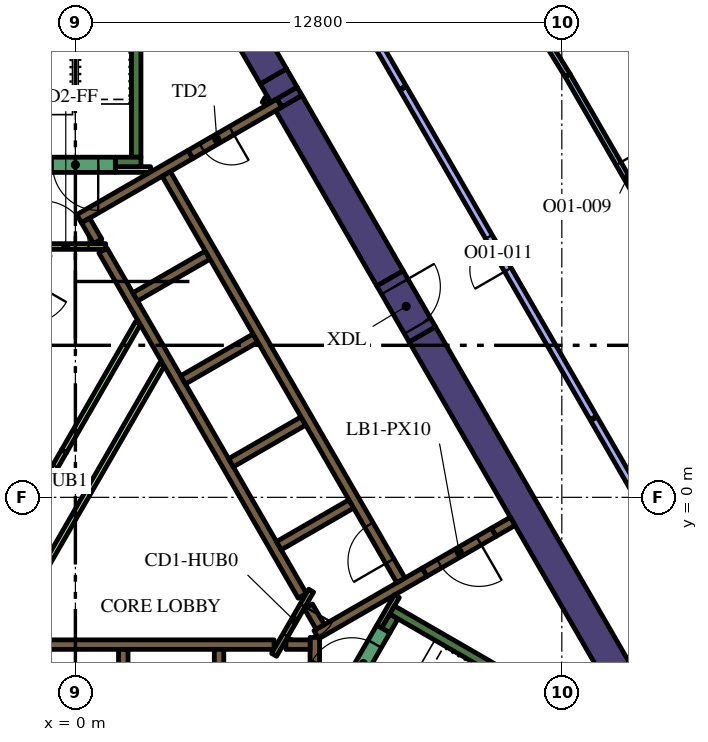
"""IFC4 building model, lengths in metres.
Left out: names, types, materials, properties, quantities, classifications, styles, units other than length and angle.
Written with IfcOpenShell. Run it as: python <this file> out.ifc"""

import sys

from ifc_helpers import new_model, si_unit, direction, frame, frame_2d, origin, place, context, subcontext, project, spatial, polyline, rectangle, outline, extrude, element, fill, save


model = new_model("IFC4")
c1 = context("Model", 3, precision=1e-05, world=origin(), true_north=direction((0.0, 1.0)))
c2 = subcontext(c1, "Body", "Model", "MODEL_VIEW")
j1 = project(units=[si_unit("LENGTHUNIT", "METRE"), si_unit("PLANEANGLEUNIT", "RADIAN")], contexts=[c1])
p1 = place(None, origin())
s1 = spatial("IfcSite", under=j1, at=p1, CompositionType="ELEMENT")
p2 = place(p1, origin())
s2 = spatial("IfcBuilding", under=s1, at=p2, CompositionType="ELEMENT")
p3 = place(p2, frame((0.0, 0.0, 145.8)))
s3 = spatial("IfcBuildingStorey", under=s2, at=p3, CompositionType="ELEMENT", Elevation=145.8)
p4 = place(p3, frame((9.129, 4.289, 0.0), z_axis=(0.0, 0.0, 1.0), x_axis=(0.499995742806, -0.866027861663, 0.0)))
e1 = element("IfcWall", 1, at=p4, inside=s3, PredefinedType="SOLIDWALL", context=c2, shape_type="SweptSolid", body=[
    extrude(rectangle(XDim=12.527, YDim=0.8, at=frame_2d((6.264, 0.0))), origin(), (0.0, 0.0, 1.0), 4.2),
])
p5 = place(p3, frame((5.489, 10.594, 0.0), z_axis=(0.0, 0.0, 1.0), x_axis=(-0.500000383388, 0.866025182435, 0.0)))
e2 = element("IfcWall", 2, at=p5, inside=s3, PredefinedType="SOLIDWALL", context=c2, shape_type="SweptSolid", body=[
    extrude(rectangle(XDim=0.558, YDim=0.8, at=frame_2d((0.279, 0.0))), origin(), (0.0, 0.0, 1.0), 4.2),
])
p6 = place(p3, frame((5.615, 10.375, 0.0), z_axis=(0.0, 0.0, 1.0), x_axis=(0.500002746266, -0.866023818221, 0.0)))
e3 = element("IfcWall", 3, at=p6, inside=s3, PredefinedType="SOLIDWALL", context=c2, shape_type="SweptSolid", body=[
    extrude(rectangle(XDim=5.328, YDim=0.8, at=frame_2d((2.664, 0.0))), origin(), (0.0, 0.0, 1.0), 4.2),
])
p7 = place(p3, origin())
e4 = element("IfcWall", 4, at=p7, inside=s3, PredefinedType="SOLIDWALL", context=c2, shape_type="SweptSolid", body=[
    extrude(outline(polyline([(5.432, 10.272), (5.308, 10.487), (5.836, 10.792), (5.96, 10.577), (5.432, 10.272)])), origin(), (0.0, 0.0, 1.0), 4.2),
])
p8 = place(p3, frame((5.209, 11.078, 0.0), z_axis=(0.0, 0.0, 1.0), x_axis=(-0.500035624827, 0.866004834804, 0.0)))
e5 = element("IfcWall", 5, at=p8, inside=s3, PredefinedType="SOLIDWALL", context=c2, shape_type="SweptSolid", body=[
    extrude(rectangle(XDim=6.388, YDim=0.8, at=frame_2d((3.194, 0.0))), origin(), (0.0, 0.0, 1.0), 4.2),
])
p9 = place(p3, frame((8.334, -2.964, 0.0), z_axis=(0.0, 0.0, 1.0), x_axis=(0.866016039709, -0.500016218704, 0.0)))
e6 = element("IfcWall", 6, at=p9, inside=s3, PredefinedType="SOLIDWALL", context=c2, shape_type="SweptSolid", body=[
    extrude(rectangle(XDim=7.05, YDim=0.25, at=frame_2d((3.525, 0.0))), origin(), (0.0, 0.0, 1.0), 4.2),
])
p10 = place(p3, frame((8.168, -3.503, 0.0), z_axis=(0.0, 0.0, 1.0), x_axis=(0.49972245349, 0.866185586049, 0.0)))
e7 = element("IfcWall", 7, at=p10, inside=s3, PredefinedType="SOLIDWALL", context=c2, shape_type="SweptSolid", body=[
    extrude(rectangle(XDim=0.425, YDim=0.25, at=frame_2d((0.212, 0.0))), origin(), (0.0, 0.0, 1.0), 4.2),
])
p11 = place(p3, frame((1.6, 8.95, 0.0), z_axis=(0.0, 0.0, 1.0), x_axis=(0.0, 1.0, 0.0)))
e8 = element("IfcWall", 8, at=p11, inside=s3, PredefinedType="SOLIDWALL", context=c2, shape_type="SweptSolid", body=[
    extrude(rectangle(XDim=6.8, YDim=0.25, at=frame_2d((3.4, 0.0))), origin(), (0.0, 0.0, 1.0), 4.2),
])
p12 = place(p3, frame((1.05, 8.825, 0.0), z_axis=(0.0, 0.0, 1.0), x_axis=(1.0, 0.0, 0.0)))
e9 = element("IfcWall", 9, at=p12, inside=s3, PredefinedType="SOLIDWALL", context=c2, shape_type="SweptSolid", body=[
    extrude(rectangle(XDim=0.675, YDim=0.25, at=frame_2d((0.337, 0.0))), origin(), (0.0, 0.0, 1.0), 4.2),
])
p13 = place(p3, frame((-5.259, -3.875, 0.0), z_axis=(0.0, 0.0, 1.0), x_axis=(1.0, 0.0, 0.0)))
e10 = element("IfcWall", 10, at=p13, inside=s3, PredefinedType="SOLIDWALL", context=c2, shape_type="SweptSolid", body=[
    extrude(rectangle(XDim=10.489, YDim=0.25, at=frame_2d((5.244, 0.0))), origin(), (0.0, 0.0, 1.0), 4.2),
])
for number, where, z_axis, x_axis in (
    (11, (3.78, -4.0, 0.0), (0.0, 0.0, 1.0), (0.0, -1.0, 0.0)),
    (12, (1.26, -4.0, 0.0), (0.0, 0.0, 1.0), (0.0, -1.0, 0.0)),
):
    element("IfcWall", number, at=place(p3, frame(where, z_axis=z_axis, x_axis=x_axis)), inside=s3, PredefinedType="SOLIDWALL", context=c2, shape_type="SweptSolid", body=[
        extrude(rectangle(XDim=2.2, YDim=0.25, at=frame_2d((1.1, 0.0))), origin(), (0.0, 0.0, 1.0), 4.2),
    ])
p14 = place(p3, frame((6.3, -7.24, 0.0), z_axis=(0.0, 0.0, 1.0), x_axis=(0.0, 1.0, 0.0)))
e13 = element("IfcWall", 13, at=p14, inside=s3, PredefinedType="SOLIDWALL", context=c2, shape_type="SweptSolid", body=[
    extrude(rectangle(XDim=3.556, YDim=0.25, at=frame_2d((1.778, 0.0))), origin(), (0.0, 0.0, 1.0), 4.2),
])
p15 = place(p3, frame((5.538, -3.875, 0.0), z_axis=(0.0, 0.0, 1.0), x_axis=(1.0, 0.0, 0.0)))
e14 = element("IfcWall", 14, at=p15, inside=s3, PredefinedType="SOLIDWALL", context=c2, shape_type="SweptSolid", body=[
    extrude(rectangle(XDim=0.637, YDim=0.25, at=frame_2d((0.318, 0.0))), origin(), (0.0, 0.0, 1.0), 4.2),
])
p16 = place(p3, frame((9.19, -1.969, 0.0), z_axis=(0.0, 0.0, 1.0), x_axis=(-0.866057109641, -0.499945079824, 0.0)))
e15 = element("IfcWall", 15, at=p16, inside=s3, PredefinedType="SOLIDWALL", context=c2, shape_type="SweptSolid", body=[
    extrude(rectangle(XDim=3.291, YDim=0.25, at=frame_2d((1.646, 0.0))), origin(), (0.0, 0.0, 1.0), 4.2),
])
p17 = place(p3, frame((6.13, -2.867, 0.0), z_axis=(0.0, 0.0, 1.0), x_axis=(0.500160776593, -0.865932559475, 0.0)))
e16 = element("IfcWall", 16, at=p17, inside=s3, PredefinedType="SOLIDWALL", context=c2, shape_type="SweptSolid", body=[
    extrude(rectangle(XDim=0.627, YDim=0.25, at=frame_2d((0.313, 0.0))), origin(), (0.0, 0.0, 1.0), 4.2),
])
p18 = place(p3, frame((11.507, -0.631, 0.0), z_axis=(0.0, 0.0, 1.0), x_axis=(-0.866093731455, -0.499881634324, 0.0)))
e17 = element("IfcWall", 17, at=p18, inside=s3, PredefinedType="SOLIDWALL", context=c2, shape_type="SweptSolid", body=[
    extrude(rectangle(XDim=0.575, YDim=0.25, at=frame_2d((0.288, 0.0))), origin(), (0.0, 0.0, 1.0), 4.2),
])
p19 = place(p3, frame((3.028, 9.023, 0.0), z_axis=(0.0, 0.0, 1.0), x_axis=(-0.866036587186, -0.49998062928, 0.0)))
e18 = element("IfcWall", 18, at=p19, inside=s3, PredefinedType="SOLIDWALL", context=c2, shape_type="SweptSolid", body=[
    extrude(rectangle(XDim=3.384, YDim=0.25, at=frame_2d((1.692, 0.0))), origin(), (0.0, 0.0, 1.0), 4.2),
])
p20 = place(p3, frame((0.268, 7.285, 0.0), z_axis=(0.0, 0.0, 1.0), x_axis=(0.500098681536, -0.865968422476, 0.0)))
e19 = element("IfcWall", 19, at=p20, inside=s3, PredefinedType="SOLIDWALL", context=c2, shape_type="SweptSolid", body=[
    extrude(rectangle(XDim=0.636, YDim=0.25, at=frame_2d((0.318, 0.0))), origin(), (0.0, 0.0, 1.0), 4.2),
])
p21 = place(p3, frame((5.97, -2.591, 0.0), z_axis=(0.0, 0.0, 1.0), x_axis=(-0.499994469932, 0.866028596547, 0.0)))
e20 = element("IfcWall", 20, at=p21, inside=s3, PredefinedType="SOLIDWALL", context=c2, shape_type="SweptSolid", body=[
    extrude(rectangle(XDim=10.488, YDim=0.25, at=frame_2d((5.244, 0.0))), origin(), (0.0, 0.0, 1.0), 4.2),
])
p22 = place(p3, frame((1.574, 5.274, 0.0), z_axis=(0.0, 0.0, 1.0), x_axis=(0.866028486751, 0.499994660107, 0.0)))
e21 = element("IfcWall", 21, at=p22, inside=s3, PredefinedType="SOLIDWALL", context=c2, shape_type="SweptSolid", body=[
    extrude(rectangle(XDim=2.2, YDim=0.25, at=frame_2d((1.1, 0.0))), origin(), (0.0, 0.0, 1.0), 4.2),
])
for number, where, z_axis, x_axis in (
    (22, (2.834, 3.091, 0.0), (0.0, 0.0, 1.0), (0.866, 0.5, 0.0)),
    (23, (4.094, 0.909, 0.0), (0.0, 0.0, 1.0), (0.866, 0.5, 0.0)),
    (24, (5.354, -1.274, 0.0), (0.0, 0.0, 1.0), (0.866, 0.5, 0.0)),
):
    element("IfcWall", number, at=place(p3, frame(where, z_axis=z_axis, x_axis=x_axis)), inside=s3, PredefinedType="SOLIDWALL", context=c2, shape_type="SweptSolid", body=[
        extrude(rectangle(XDim=2.2, YDim=0.25, at=frame_2d((1.1, 0.0))), origin(), (0.0, 0.0, 1.0), 4.2),
    ])
p23 = place(p3, frame((1.05, 8.625, 0.0), z_axis=(0.0, 0.0, 1.0), x_axis=(1.0, 0.0, 0.0)))
e25 = element("IfcWall", 25, at=p23, inside=s3, PredefinedType="PARTITIONING", context=c2, shape_type="SweptSolid", body=[
    extrude(rectangle(XDim=0.929, YDim=0.15, at=frame_2d((0.464, 0.0))), origin(), (0.0, 0.0, 1.0), 3.15),
])
p24 = place(p3, frame((4.98, 10.358, 0.0), z_axis=(0.0, 0.0, 1.0), x_axis=(0.500640202437, 0.86565546709, 0.0)))
e26 = element("IfcWall", 26, at=p24, inside=s3, PredefinedType="PARTITIONING", context=c2, shape_type="SweptSolid", body=[
    extrude(rectangle(XDim=0.146, YDim=0.15, at=frame_2d((0.073, 0.0))), origin(), (0.0, 0.0, 1.0), 3.15),
])
p25 = place(p3, frame((8.459, -2.599, 0.0), z_axis=(0.0, 0.0, 1.0), x_axis=(-0.500041054325, -0.866001699761, 0.0)))
e27 = element("IfcWall", 27, at=p25, inside=s3, PredefinedType="PARTITIONING", context=c2, shape_type="SweptSolid", body=[
    extrude(rectangle(XDim=0.929, YDim=0.15, at=frame_2d((0.464, 0.0))), origin(), (0.0, 0.0, 1.0), 4.2),
])
p26 = place(p3, frame((-1.887, -3.718, 0.0), z_axis=(0.0, 0.0, 1.0), x_axis=(0.500005008002, 0.866022512394, 0.0)))
e28 = element("IfcWall", 28, at=p26, inside=s3, PredefinedType="PARTITIONING", context=c2, shape_type="SweptSolid", body=[
    extrude(rectangle(XDim=8.327, YDim=0.15, at=frame_2d((4.164, 0.0))), origin(), (0.0, 0.0, 1.0), 3.15),
])
p27 = place(p3, frame((-0.3, 1.212, 0.0), z_axis=(0.0, 0.0, 1.0), x_axis=(0.499963101113, 0.866046706318, 0.0)))
e29 = element("IfcWall", 29, at=p27, inside=s3, PredefinedType="PARTITIONING", context=c2, shape_type="SweptSolid", body=[
    extrude(rectangle(XDim=3.893, YDim=0.15, at=frame_2d((1.947, 0.0))), origin(), (0.0, 0.0, 1.0), 3.15),
])
p28 = place(p3, frame((8.565, -2.185, 0.0), z_axis=(0.0, 0.0, 1.0), x_axis=(-0.499997954832, 0.866026584559, 0.0)))
e30 = element("IfcWall", 30, at=p28, inside=s3, PredefinedType="SOLIDWALL", context=c2, shape_type="SweptSolid", body=[
    extrude(rectangle(XDim=12.35, YDim=0.25, at=frame_2d((6.175, 0.0))), origin(), (0.0, 0.0, 1.0), 4.2),
])
p29 = place(p28, frame((0.585, 0.0, 0.0)))
e31 = element("IfcOpeningElement", 31, at=p29, cuts=e30, PredefinedType="OPENING", context=c2, shape_type="SweptSolid", body=[
    extrude(rectangle(XDim=1.1, YDim=2.1, at=frame_2d((0.55, 1.05))), frame((0.0, 0.135, 0.0), z_axis=(0.0, -1.0, 0.0), x_axis=(1.0, 0.0, 0.0)), (0.0, 0.0, 1.0), 0.27),
])
p30 = place(p3, frame((7.053, -5.284, 0.0), z_axis=(0.0, 0.0, 1.0), x_axis=(0.500078061341, 0.865980330357, 0.0)))
e32 = element("IfcWall", 32, at=p30, inside=s3, PredefinedType="SOLIDWALL", context=c2, shape_type="SweptSolid", body=[
    extrude(rectangle(XDim=2.1, YDim=0.4, at=frame_2d((1.05, 0.0))), origin(), (0.0, 0.0, 1.0), 4.2),
])
p31 = place(p30, frame((0.45, 0.0, 0.0)))
e33 = element("IfcOpeningElement", 33, at=p31, cuts=e32, PredefinedType="OPENING", context=c2, shape_type="SweptSolid", body=[
    extrude(rectangle(XDim=1.2, YDim=2.1, at=frame_2d((0.6, 1.05))), frame((0.0, 0.21, 0.0), z_axis=(0.0, -1.0, 0.0), x_axis=(1.0, 0.0, 0.0)), (0.0, 0.0, 1.0), 0.42),
])
p32 = place(p3, frame((1.05, 8.75, 0.0), z_axis=(0.0, 0.0, 1.0), x_axis=(-1.0, 0.0, 0.0)))
e34 = element("IfcWall", 34, at=p32, inside=s3, PredefinedType="SOLIDWALL", context=c2, shape_type="SweptSolid", body=[
    extrude(rectangle(XDim=2.1, YDim=0.4, at=frame_2d((1.05, 0.0))), origin(), (0.0, 0.0, 1.0), 4.2),
])
p33 = place(p32, frame((0.45, 0.0, 0.0)))
e35 = element("IfcOpeningElement", 35, at=p33, cuts=e34, PredefinedType="OPENING", context=c2, shape_type="SweptSolid", body=[
    extrude(rectangle(XDim=1.2, YDim=2.1, at=frame_2d((0.6, 1.05))), frame((0.0, 0.21, 0.0), z_axis=(0.0, -1.0, 0.0), x_axis=(1.0, 0.0, 0.0)), (0.0, 0.0, 1.0), 0.42),
])
p34 = place(p3, frame((5.366, 10.373, 0.0), z_axis=(0.0, 0.0, 1.0), x_axis=(-0.866019956843, -0.50000943426, 0.0)))
e36 = element("IfcWall", 36, at=p34, inside=s3, PredefinedType="SOLIDWALL", context=c2, shape_type="SweptSolid", body=[
    extrude(rectangle(XDim=2.7, YDim=0.25, at=frame_2d((1.35, 0.0))), origin(), (0.0, 0.0, 1.0), 4.2),
])
p35 = place(p34, frame((1.45, 0.0, 0.0)))
e37 = element("IfcOpeningElement", 37, at=p35, cuts=e36, PredefinedType="OPENING", context=c2, shape_type="SweptSolid", body=[
    extrude(rectangle(XDim=0.9, YDim=2.1, at=frame_2d((0.45, 1.05))), frame((0.0, 0.135, 0.0), z_axis=(0.0, -1.0, 0.0), x_axis=(1.0, 0.0, 0.0)), (0.0, 0.0, 1.0), 0.27),
])
p36 = place(p3, frame((6.203, -2.456, 0.0), z_axis=(0.0, 0.0, 1.0), x_axis=(-0.500043961785, -0.866000020948, 0.0)))
e38 = element("IfcWall", 38, at=p36, inside=s3, PredefinedType="PARTITIONING", context=c2, shape_type="SweptSolid", body=[
    extrude(rectangle(XDim=1.95, YDim=0.15, at=frame_2d((0.975, 0.0))), origin(), (0.0, 0.0, 1.0), 4.2),
])
p37 = place(p36, frame((0.45, 0.0, 0.0)))
e39 = element("IfcOpeningElement", 39, at=p37, cuts=e38, PredefinedType="OPENING", context=c2, shape_type="SweptSolid", body=[
    extrude(rectangle(XDim=0.9, YDim=2.1, at=frame_2d((0.45, 1.05))), frame((0.0, 0.085, 0.0), z_axis=(0.0, -1.0, 0.0), x_axis=(1.0, 0.0, 0.0)), (0.0, 0.0, 1.0), 0.17),
])
p38 = place(p3, frame((-1.303, 6.6, 0.0), z_axis=(0.0, 0.0, 1.0), x_axis=(1.0, 0.0, 0.0)))
e40 = element("IfcWall", 40, at=p38, inside=s3, PredefinedType="PARTITIONING", context=c2, shape_type="SweptSolid", body=[
    extrude(rectangle(XDim=2.1, YDim=0.15, at=frame_2d((1.05, 0.0))), origin(), (0.0, 0.0, 1.0), 4.2),
])
p39 = place(p38, frame((0.45, 0.0, 0.0)))
e41 = element("IfcOpeningElement", 41, at=p39, cuts=e40, PredefinedType="OPENING", context=c2, shape_type="SweptSolid", body=[
    extrude(rectangle(XDim=1.2, YDim=2.1, at=frame_2d((0.6, 1.05))), frame((0.0, 0.085, 0.0), z_axis=(0.0, -1.0, 0.0), x_axis=(1.0, 0.0, 0.0)), (0.0, 0.0, 1.0), 0.17),
])
p40 = place(p3, frame((11.009, -0.919, 0.0), z_axis=(0.0, 0.0, 1.0), x_axis=(-0.866059744384, -0.49994051562, 0.0)))
e42 = element("IfcWall", 42, at=p40, inside=s3, PredefinedType="SOLIDWALL", context=c2, shape_type="SweptSolid", body=[
    extrude(rectangle(XDim=2.1, YDim=0.25, at=frame_2d((1.05, 0.0))), origin(), (0.0, 0.0, 1.0), 4.2),
])
p41 = place(p40, frame((0.45, 0.0, 0.0)))
e43 = element("IfcOpeningElement", 43, at=p41, cuts=e42, PredefinedType="OPENING", context=c2, shape_type="SweptSolid", body=[
    extrude(rectangle(XDim=1.2, YDim=2.1, at=frame_2d((0.6, 1.05))), frame((0.0, 0.135, 0.0), z_axis=(0.0, -1.0, 0.0), x_axis=(1.0, 0.0, 0.0)), (0.0, 0.0, 1.0), 0.27),
])
p42 = place(p3, frame((8.279, 5.761, 0.0), z_axis=(0.0, 0.0, 1.0), x_axis=(0.500062241894, -0.865989465428, 0.0)))
e44 = element("IfcWall", 44, at=p42, inside=s3, PredefinedType="SOLIDWALL", context=c2, shape_type="SweptSolid", body=[
    extrude(rectangle(XDim=1.7, YDim=0.8, at=frame_2d((0.85, 0.0))), origin(), (0.0, 0.0, 1.0), 4.2),
])
p43 = place(p42, frame((0.25, 0.0, 0.0)))
e45 = element("IfcOpeningElement", 45, at=p43, cuts=e44, PredefinedType="OPENING", context=c2, shape_type="SweptSolid", body=[
    extrude(rectangle(XDim=1.2, YDim=2.1, at=frame_2d((0.6, 1.05))), frame((0.0, 0.41, 0.0), z_axis=(0.0, -1.0, 0.0), x_axis=(1.0, 0.0, 0.0)), (0.0, 0.0, 1.0), 0.82),
])
p44 = place(p3, frame((-1.2, -0.346, 0.0), z_axis=(0.0, 0.0, 1.0), x_axis=(0.499961193289, 0.866047807691, 0.0)))
e46 = element("IfcWall", 46, at=p44, inside=s3, PredefinedType="PARTITIONING", context=c2, shape_type="SweptSolid", body=[
    extrude(rectangle(XDim=1.8, YDim=0.15, at=frame_2d((0.9, 0.0))), origin(), (0.0, 0.0, 1.0), 3.15),
])
p45 = place(p44, frame((0.45, 0.0, 0.0)))
e47 = element("IfcOpeningElement", 47, at=p45, cuts=e46, PredefinedType="OPENING", context=c2, shape_type="SweptSolid", body=[
    extrude(rectangle(XDim=0.9, YDim=2.1, at=frame_2d((0.45, 1.05))), frame((0.0, 0.085, 0.0), z_axis=(0.0, -1.0, 0.0), x_axis=(1.0, 0.0, 0.0)), (0.0, 0.0, 1.0), 0.17),
])
p46 = place(p3, frame((12.951, 11.104, 0.0), z_axis=(0.0, 0.0, 1.0), x_axis=(0.499992691614, -0.866029623242, 0.0)))
e48 = element("IfcWall", 48, at=p46, inside=s3, PredefinedType="PARTITIONING", context=c2, shape_type="SweptSolid", body=[
    extrude(rectangle(XDim=6.282, YDim=0.15, at=frame_2d((3.141, 0.0))), origin(), (0.0, 0.0, 1.0), 3.15),
])
p47 = place(p46, frame((2.683, 0.0, 0.0)))
e49 = element("IfcOpeningElement", 49, at=p47, cuts=e48, PredefinedType="OPENING", context=c2, shape_type="SweptSolid", body=[
    extrude(rectangle(XDim=0.9, YDim=2.1, at=frame_2d((0.45, 1.05))), frame((0.0, 0.085, 0.0), z_axis=(0.0, -1.0, 0.0), x_axis=(1.0, 0.0, 0.0)), (0.0, 0.0, 1.0), 0.17),
])
p48 = place(p3, frame((12.951, 11.104, 0.0), z_axis=(0.0, 0.0, 1.0), x_axis=(-0.526204763311, 0.850357893518, 0.0)))
e50 = element("IfcWall", 50, at=p48, inside=s3, PredefinedType="PARTITIONING", context=c2, shape_type="SweptSolid", body=[
    extrude(rectangle(XDim=3.197, YDim=0.15, at=frame_2d((1.599, 0.0))), origin(), (0.0, 0.0, 1.0), 3.15),
])
p49 = place(p3, frame((13.63, 2.091, 0.0), z_axis=(0.0, 0.0, 1.0), x_axis=(-0.499990634175, 0.866030811078, 0.0)))
e51 = element("IfcWall", 51, at=p49, inside=s3, PredefinedType="PARTITIONING", context=c2, shape_type="SweptSolid", body=[
    extrude(rectangle(XDim=10.008, YDim=0.2, at=frame_2d((5.004, 0.0))), origin(), (0.0, 0.0, 1.0), 3.15),
])
p50 = place(p49, frame((4.5, 0.0, 0.0)))
e52 = element("IfcOpeningElement", 52, at=p50, cuts=e51, PredefinedType="OPENING", context=c2, shape_type="SweptSolid", body=[
    extrude(rectangle(XDim=1.0, YDim=2.1, at=frame_2d((0.5, 1.05))), frame((0.0, 0.11, 0.0), z_axis=(0.0, -1.0, 0.0), x_axis=(1.0, 0.0, 0.0)), (0.0, 0.0, 1.0), 0.22),
])
p51 = place(p3, frame((8.611, 10.785, 0.0), z_axis=(0.0, 0.0, 1.0), x_axis=(-0.499987928593, 0.866032373102, 0.0)))
e53 = element("IfcWall", 53, at=p51, inside=s3, PredefinedType="PARTITIONING", context=c2, shape_type="SweptSolid", body=[
    extrude(rectangle(XDim=8.889, YDim=0.2, at=frame_2d((4.445, 0.0))), origin(), (0.0, 0.0, 1.0), 3.15),
])
p52 = place(p3, frame((18.504, -6.35, 0.0), z_axis=(0.0, 0.0, 1.0), x_axis=(-0.499995029582, 0.866028273438, 0.0)))
e54 = element("IfcWall", 54, at=p52, inside=s3, PredefinedType="PARTITIONING", context=c2, shape_type="SweptSolid", body=[
    extrude(rectangle(XDim=9.717, YDim=0.2, at=frame_2d((4.859, 0.0))), origin(), (0.0, 0.0, 1.0), 3.15),
])
p53 = place(p29, origin())
e55 = element("IfcDoor", 55, at=p53, inside=s3, OperationType="DOUBLE_DOOR_SLIDING", PredefinedType="DOOR", context=c2, shape_type="SweptSolid", body=[
    extrude(rectangle(XDim=1.1, YDim=2.1, at=frame_2d((0.55, 1.05))), frame((0.0, 0.025, 0.0), z_axis=(0.0, -1.0, 0.0), x_axis=(1.0, 0.0, 0.0)), (0.0, 0.0, 1.0), 0.05),
])
fill(e31, e55)
p54 = place(p31, origin())
e56 = element("IfcDoor", 56, at=p54, inside=s3, OperationType="SINGLE_SWING_LEFT", PredefinedType="DOOR", context=c2, shape_type="SweptSolid", body=[
    extrude(rectangle(XDim=1.2, YDim=2.1, at=frame_2d((0.6, 1.05))), frame((0.0, 0.025, 0.0), z_axis=(0.0, -1.0, 0.0), x_axis=(1.0, 0.0, 0.0)), (0.0, 0.0, 1.0), 0.05),
])
fill(e33, e56)
p55 = place(p33, origin())
e57 = element("IfcDoor", 57, at=p55, inside=s3, OperationType="SINGLE_SWING_LEFT", PredefinedType="DOOR", context=c2, shape_type="SweptSolid", body=[
    extrude(rectangle(XDim=1.2, YDim=2.1, at=frame_2d((0.6, 1.05))), frame((0.0, 0.025, 0.0), z_axis=(0.0, -1.0, 0.0), x_axis=(1.0, 0.0, 0.0)), (0.0, 0.0, 1.0), 0.05),
])
fill(e35, e57)
p56 = place(p35, origin())
e58 = element("IfcDoor", 58, at=p56, inside=s3, OperationType="SINGLE_SWING_LEFT", PredefinedType="DOOR", context=c2, shape_type="SweptSolid", body=[
    extrude(rectangle(XDim=0.9, YDim=2.1, at=frame_2d((0.45, 1.05))), frame((0.0, 0.025, 0.0), z_axis=(0.0, -1.0, 0.0), x_axis=(1.0, 0.0, 0.0)), (0.0, 0.0, 1.0), 0.05),
])
fill(e37, e58)
p57 = place(p37, origin())
e59 = element("IfcDoor", 59, at=p57, inside=s3, OperationType="SINGLE_SWING_LEFT", PredefinedType="DOOR", context=c2, shape_type="SweptSolid", body=[
    extrude(rectangle(XDim=0.9, YDim=2.1, at=frame_2d((0.45, 1.05))), frame((0.0, 0.025, 0.0), z_axis=(0.0, -1.0, 0.0), x_axis=(1.0, 0.0, 0.0)), (0.0, 0.0, 1.0), 0.05),
])
fill(e39, e59)
p58 = place(p39, origin())
e60 = element("IfcDoor", 60, at=p58, inside=s3, OperationType="SINGLE_SWING_LEFT", PredefinedType="DOOR", context=c2, shape_type="SweptSolid", body=[
    extrude(rectangle(XDim=1.2, YDim=2.1, at=frame_2d((0.6, 1.05))), frame((0.0, 0.025, 0.0), z_axis=(0.0, -1.0, 0.0), x_axis=(1.0, 0.0, 0.0)), (0.0, 0.0, 1.0), 0.05),
])
fill(e41, e60)
p59 = place(p41, origin())
e61 = element("IfcDoor", 61, at=p59, inside=s3, OperationType="SINGLE_SWING_LEFT", PredefinedType="DOOR", context=c2, shape_type="SweptSolid", body=[
    extrude(rectangle(XDim=1.2, YDim=2.1, at=frame_2d((0.6, 1.05))), frame((0.0, 0.025, 0.0), z_axis=(0.0, -1.0, 0.0), x_axis=(1.0, 0.0, 0.0)), (0.0, 0.0, 1.0), 0.05),
])
fill(e43, e61)
p60 = place(p43, origin())
e62 = element("IfcDoor", 62, at=p60, inside=s3, OperationType="SINGLE_SWING_LEFT", PredefinedType="DOOR", context=c2, shape_type="SweptSolid", body=[
    extrude(rectangle(XDim=1.2, YDim=2.1, at=frame_2d((0.6, 1.05))), frame((0.0, 0.025, 0.0), z_axis=(0.0, -1.0, 0.0), x_axis=(1.0, 0.0, 0.0)), (0.0, 0.0, 1.0), 0.05),
])
fill(e45, e62)
p61 = place(p45, origin())
e63 = element("IfcDoor", 63, at=p61, inside=s3, OperationType="SINGLE_SWING_LEFT", PredefinedType="DOOR", context=c2, shape_type="SweptSolid", body=[
    extrude(rectangle(XDim=0.9, YDim=2.1, at=frame_2d((0.45, 1.05))), frame((0.0, 0.025, 0.0), z_axis=(0.0, -1.0, 0.0), x_axis=(1.0, 0.0, 0.0)), (0.0, 0.0, 1.0), 0.05),
])
fill(e47, e63)
p62 = place(p47, origin())
e64 = element("IfcDoor", 64, at=p62, inside=s3, OperationType="SINGLE_SWING_LEFT", PredefinedType="DOOR", context=c2, shape_type="SweptSolid", body=[
    extrude(rectangle(XDim=0.9, YDim=2.1, at=frame_2d((0.45, 1.05))), frame((0.0, 0.025, 0.0), z_axis=(0.0, -1.0, 0.0), x_axis=(1.0, 0.0, 0.0)), (0.0, 0.0, 1.0), 0.05),
])
fill(e49, e64)
p63 = place(p50, origin())
e65 = element("IfcDoor", 65, at=p63, inside=s3, OperationType="SINGLE_SWING_LEFT", PredefinedType="DOOR", context=c2, shape_type="SweptSolid", body=[
    extrude(rectangle(XDim=1.0, YDim=2.1, at=frame_2d((0.5, 1.05))), frame((0.0, 0.025, 0.0), z_axis=(0.0, -1.0, 0.0), x_axis=(1.0, 0.0, 0.0)), (0.0, 0.0, 1.0), 0.05),
])
fill(e52, e65)
save(model, sys.argv[1])
